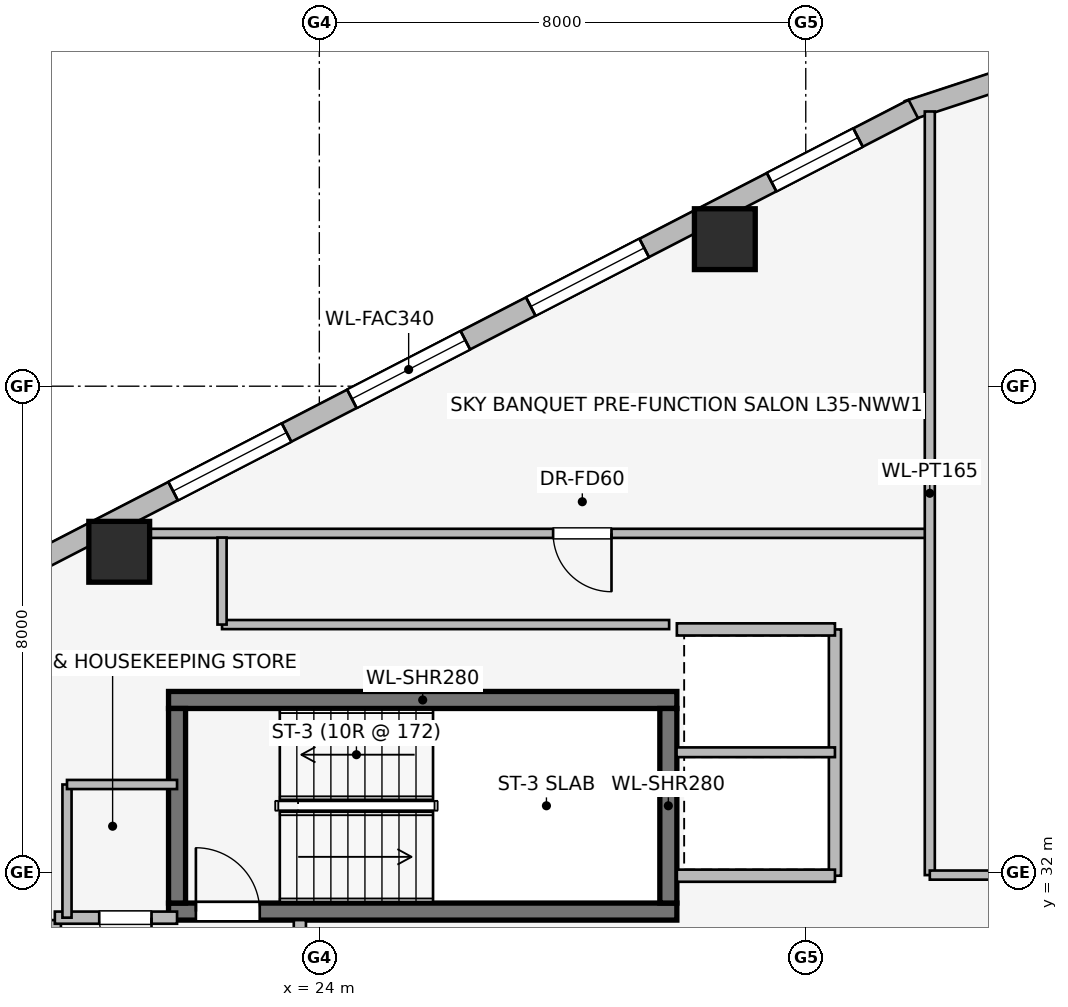
"""IFC4 building model, lengths in metres.
Left out: names, types, materials, properties, quantities, classifications, styles, units other than length and angle.
Written with IfcOpenShell. Run it as: python <this file> out.ifc"""

import sys

from ifc_helpers import new_model, si_unit, direction, frame, frame_2d, origin, origin_2d, place, context, subcontext, project, spatial, rectangle, extrude, element, fill, save


model = new_model("IFC4")
c1 = context("Model", 3, precision=1e-05, world=origin(), true_north=direction((0.0, 1.0)))
c2 = subcontext(c1, "Body", "Model", "MODEL_VIEW")
j1 = project(units=[si_unit("LENGTHUNIT", "METRE"), si_unit("PLANEANGLEUNIT", "RADIAN")], contexts=[c1])
p1 = place(None, origin())
s1 = spatial("IfcSite", under=j1, at=p1, CompositionType="ELEMENT")
p2 = place(p1, origin())
s2 = spatial("IfcBuilding", under=s1, at=p2, CompositionType="ELEMENT")
p3 = place(p2, frame((0.0, 0.0, 132.6)))
s3 = spatial("IfcBuildingStorey", under=s2, at=p3, CompositionType="ELEMENT", Elevation=132.6)
p4 = place(p3, frame((21.52, 31.36, 0.0), z_axis=(0.0, 0.0, 1.0), x_axis=(1.0, 0.0, 0.0)))
e1 = element("IfcWall", 1, at=p4, inside=s3, PredefinedType="SHEAR", context=c2, shape_type="SweptSolid", body=[
    extrude(rectangle(XDim=8.36, YDim=0.28, at=frame_2d((4.18, 0.0))), origin(), (0.0, 0.0, 1.0), 3.45),
])
p5 = place(p4, frame((0.45, 0.0, 0.0)))
e2 = element("IfcOpeningElement", 2, at=p5, cuts=e1, PredefinedType="OPENING", context=c2, shape_type="SweptSolid", body=[
    extrude(rectangle(XDim=1.05, YDim=2.0, at=frame_2d((0.525, 1.0))), frame((0.0, 0.15, 0.0), z_axis=(0.0, -1.0, 0.0), x_axis=(1.0, 0.0, 0.0)), (0.0, 0.0, 1.0), 0.3),
])
p6 = place(p3, frame((29.88, 34.84, 0.0), z_axis=(0.0, 0.0, 1.0), x_axis=(-1.0, 0.0, 0.0)))
e3 = element("IfcWall", 3, at=p6, inside=s3, PredefinedType="SHEAR", context=c2, shape_type="SweptSolid", body=[
    extrude(rectangle(XDim=8.36, YDim=0.28, at=frame_2d((4.18, 0.0))), origin(), (0.0, 0.0, 1.0), 3.45),
])
for number, where, z_axis, x_axis in (
    (4, (21.66, 34.7, 0.0), (0.0, 0.0, 1.0), (0.0, -1.0, 0.0)),
    (5, (29.74, 31.5, 0.0), (0.0, 0.0, 1.0), (0.0, 1.0, 0.0)),
):
    element("IfcWall", number, at=place(p3, frame(where, z_axis=z_axis, x_axis=x_axis)), inside=s3, PredefinedType="SHEAR", context=c2, shape_type="SweptSolid", body=[
        extrude(rectangle(XDim=3.2, YDim=0.28, at=frame_2d((1.6, 0.0))), origin(), (0.0, 0.0, 1.0), 3.45),
    ])
for number, where, z_axis, x_axis in (
    (6, (30.669, 42.418, 0.0), (0.0, 0.0, 1.0), (1.0, 0.0, 0.0)),
    (7, (20.709, 37.277, 0.0), (0.0, 0.0, 1.0), (1.0, 0.0, 0.0)),
):
    element("IfcColumn", number, at=place(p3, frame(where, z_axis=z_axis, x_axis=x_axis)), inside=s3, PredefinedType="COLUMN", context=c2, shape_type="SweptSolid", body=[
        extrude(rectangle(XDim=1.0, YDim=1.0, at=origin_2d()), origin(), (0.0, 0.0, 1.0), 3.45),
    ])
p7 = place(p3, frame((33.681, 44.532, 0.0), z_axis=(0.0, 0.0, 1.0), x_axis=(0.949937416267, 0.312440242569, 0.0)))
e8 = element("IfcWall", 8, at=p7, inside=s3, PredefinedType="STANDARD", context=c2, shape_type="SweptSolid", body=[
    extrude(rectangle(XDim=1.722, YDim=0.33, at=frame_2d((0.861, 0.0))), origin(), (0.0, 0.0, 1.0), 3.19),
])
p8 = place(p3, frame((17.169, 35.99, 0.0), z_axis=(0.0, 0.0, 1.0), x_axis=(0.888613612362, 0.458656568606, 0.0)))
e9 = element("IfcWall", 9, at=p8, inside=s3, PredefinedType="STANDARD", context=c2, shape_type="SweptSolid", body=[
    extrude(rectangle(XDim=18.681, YDim=0.34, at=frame_2d((9.34, 0.0))), origin(), (0.0, 0.0, 1.0), 3.19),
])
p9 = place(p8, frame((1.023, 0.0, 0.75)))
e10 = element("IfcOpeningElement", 10, at=p9, cuts=e9, PredefinedType="OPENING", context=c2, shape_type="SweptSolid", body=[
    extrude(rectangle(XDim=1.6, YDim=1.55, at=frame_2d((0.8, 0.775))), frame((0.0, 0.18, 0.0), z_axis=(0.0, -1.0, 0.0), x_axis=(1.0, 0.0, 0.0)), (0.0, 0.0, 1.0), 0.36),
])
p10 = place(p8, frame((4.981, 0.0, 0.75)))
e11 = element("IfcOpeningElement", 11, at=p10, cuts=e9, PredefinedType="OPENING", context=c2, shape_type="SweptSolid", body=[
    extrude(rectangle(XDim=2.1, YDim=1.5, at=frame_2d((1.05, 0.75))), frame((0.0, 0.18, 0.0), z_axis=(0.0, -1.0, 0.0), x_axis=(1.0, 0.0, 0.0)), (0.0, 0.0, 1.0), 0.36),
])
p11 = place(p8, frame((8.29, 0.0, 0.75)))
e12 = element("IfcOpeningElement", 12, at=p11, cuts=e9, PredefinedType="OPENING", context=c2, shape_type="SweptSolid", body=[
    extrude(rectangle(XDim=2.1, YDim=1.5, at=frame_2d((1.05, 0.75))), frame((0.0, 0.18, 0.0), z_axis=(0.0, -1.0, 0.0), x_axis=(1.0, 0.0, 0.0)), (0.0, 0.0, 1.0), 0.36),
])
p12 = place(p8, frame((11.6, 0.0, 0.75)))
e13 = element("IfcOpeningElement", 13, at=p12, cuts=e9, PredefinedType="OPENING", context=c2, shape_type="SweptSolid", body=[
    extrude(rectangle(XDim=2.1, YDim=1.5, at=frame_2d((1.05, 0.75))), frame((0.0, 0.18, 0.0), z_axis=(0.0, -1.0, 0.0), x_axis=(1.0, 0.0, 0.0)), (0.0, 0.0, 1.0), 0.36),
])
p13 = place(p8, frame((16.058, 0.0, 0.75)))
e14 = element("IfcOpeningElement", 14, at=p13, cuts=e9, PredefinedType="OPENING", context=c2, shape_type="SweptSolid", body=[
    extrude(rectangle(XDim=1.6, YDim=1.55, at=frame_2d((0.8, 0.775))), frame((0.0, 0.18, 0.0), z_axis=(0.0, -1.0, 0.0), x_axis=(1.0, 0.0, 0.0)), (0.0, 0.0, 1.0), 0.36),
])
p14 = place(p3, frame((19.65, 25.68, 0.0), z_axis=(0.0, 0.0, 1.0), x_axis=(0.0, 1.0, 0.0)))
e15 = element("IfcWall", 15, at=p14, inside=s3, PredefinedType="PARTITIONING", context=c2, shape_type="SweptSolid", body=[
    extrude(rectangle(XDim=5.54, YDim=0.2, at=frame_2d((2.77, 0.0))), origin(), (0.0, 0.0, 1.0), 3.19),
])
p15 = place(p14, frame((0.62, 0.0, 0.0)))
e16 = element("IfcOpeningElement", 16, at=p15, cuts=e15, PredefinedType="OPENING", context=c2, shape_type="SweptSolid", body=[
    extrude(rectangle(XDim=1.1, YDim=2.2, at=frame_2d((0.55, 1.1))), frame((0.0, 0.11, 0.0), z_axis=(0.0, -1.0, 0.0), x_axis=(1.0, 0.0, 0.0)), (0.0, 0.0, 1.0), 0.22),
])
p16 = place(p14, frame((3.12, 0.0, 0.0)))
e17 = element("IfcOpeningElement", 17, at=p16, cuts=e15, PredefinedType="OPENING", context=c2, shape_type="SweptSolid", body=[
    extrude(rectangle(XDim=1.1, YDim=2.2, at=frame_2d((0.55, 1.1))), frame((0.0, 0.11, 0.0), z_axis=(0.0, -1.0, 0.0), x_axis=(1.0, 0.0, 0.0)), (0.0, 0.0, 1.0), 0.22),
])
p17 = place(p3, frame((23.68, 25.68, 0.0), z_axis=(0.0, 0.0, 1.0), x_axis=(0.0, 1.0, 0.0)))
e18 = element("IfcWall", 18, at=p17, inside=s3, PredefinedType="PARTITIONING", context=c2, shape_type="SweptSolid", body=[
    extrude(rectangle(XDim=5.54, YDim=0.2, at=frame_2d((2.77, 0.0))), origin(), (0.0, 0.0, 1.0), 3.19),
])
p18 = place(p17, frame((1.8, 0.0, 0.0)))
e19 = element("IfcOpeningElement", 19, at=p18, cuts=e18, PredefinedType="OPENING", context=c2, shape_type="SweptSolid", body=[
    extrude(rectangle(XDim=1.05, YDim=2.0, at=frame_2d((0.525, 1.0))), frame((0.0, 0.11, 0.0), z_axis=(0.0, -1.0, 0.0), x_axis=(1.0, 0.0, 0.0)), (0.0, 0.0, 1.0), 0.22),
])
p19 = place(p3, frame((21.66, 31.26, 0.0), z_axis=(0.0, 0.0, 1.0), x_axis=(-1.0, 0.0, 0.0)))
e20 = element("IfcWall", 20, at=p19, inside=s3, PredefinedType="PARTITIONING", context=c2, shape_type="SweptSolid", body=[
    extrude(rectangle(XDim=2.01, YDim=0.2, at=frame_2d((1.005, 0.0))), origin(), (0.0, 0.0, 1.0), 3.19),
])
p20 = place(p19, frame((0.42, 0.0, 0.0)))
e21 = element("IfcOpeningElement", 21, at=p20, cuts=e20, PredefinedType="OPENING", context=c2, shape_type="SweptSolid", body=[
    extrude(rectangle(XDim=0.86, YDim=2.0, at=frame_2d((0.43, 1.0))), frame((0.0, 0.11, 0.0), z_axis=(0.0, -1.0, 0.0), x_axis=(1.0, 0.0, 0.0)), (0.0, 0.0, 1.0), 0.22),
])
p21 = place(p3, frame((32.48, 31.95, 0.0), z_axis=(0.0, 0.0, 1.0), x_axis=(0.0, 1.0, 0.0)))
e22 = element("IfcWall", 22, at=p21, inside=s3, PredefinedType="PARTITIONING", context=c2, shape_type="SweptSolid", body=[
    extrude(rectangle(XDim=4.05, YDim=0.2, at=frame_2d((2.025, 0.0))), origin(), (0.0, 0.0, 1.0), 3.19),
])
for number, where, z_axis, x_axis in (
    (23, (29.88, 36.0, 0.0), (0.0, 0.0, 1.0), (1.0, 0.0, 0.0)),
    (24, (32.48, 31.95, 0.0), (0.0, 0.0, 1.0), (-1.0, 0.0, 0.0)),
):
    element("IfcWall", number, at=place(p3, frame(where, z_axis=z_axis, x_axis=x_axis)), inside=s3, PredefinedType="PARTITIONING", context=c2, shape_type="SweptSolid", body=[
        extrude(rectangle(XDim=2.6, YDim=0.2, at=frame_2d((1.3, 0.0))), origin(), (0.0, 0.0, 1.0), 3.19),
    ])
p22 = place(p3, frame((29.875, 33.98, 0.0), z_axis=(0.0, 0.0, 1.0), x_axis=(1.0, 0.0, 0.0)))
e25 = element("IfcWall", 25, at=p22, inside=s3, PredefinedType="PARTITIONING", context=c2, shape_type="SweptSolid", body=[
    extrude(rectangle(XDim=2.605, YDim=0.16, at=frame_2d((1.302, 0.0))), origin(), (0.0, 0.0, 1.0), 3.19),
])
p23 = place(p3, frame((19.85, 33.45, 0.0), z_axis=(0.0, 0.0, 1.0), x_axis=(0.0, -1.0, 0.0)))
e26 = element("IfcWall", 26, at=p23, inside=s3, PredefinedType="PARTITIONING", context=c2, shape_type="SweptSolid", body=[
    extrude(rectangle(XDim=2.19, YDim=0.15, at=frame_2d((1.095, 0.0))), origin(), (0.0, 0.0, 1.0), 3.19),
])
p24 = place(p3, frame((21.66, 33.45, 0.0), z_axis=(0.0, 0.0, 1.0), x_axis=(-1.0, 0.0, 0.0)))
e27 = element("IfcWall", 27, at=p24, inside=s3, PredefinedType="PARTITIONING", context=c2, shape_type="SweptSolid", body=[
    extrude(rectangle(XDim=1.81, YDim=0.15, at=frame_2d((0.905, 0.0))), origin(), (0.0, 0.0, 1.0), 3.19),
])
p25 = place(p3, frame((34.0, 37.58, 0.0), z_axis=(0.0, 0.0, 1.0), x_axis=(-1.0, 0.0, 0.0)))
e28 = element("IfcWall", 28, at=p25, inside=s3, PredefinedType="PARTITIONING", context=c2, shape_type="SweptSolid", body=[
    extrude(rectangle(XDim=13.707, YDim=0.15, at=frame_2d((6.854, 0.0))), origin(), (0.0, 0.0, 1.0), 2.582),
])
p26 = place(p25, frame((5.195, 0.0, 0.0)))
e29 = element("IfcOpeningElement", 29, at=p26, cuts=e28, PredefinedType="OPENING", context=c2, shape_type="SweptSolid", body=[
    extrude(rectangle(XDim=0.96, YDim=2.0, at=frame_2d((0.48, 1.0))), frame((0.0, 0.085, 0.0), z_axis=(0.0, -1.0, 0.0), x_axis=(1.0, 0.0, 0.0)), (0.0, 0.0, 1.0), 0.17),
])
p27 = place(p3, frame((34.04, 31.96, 0.0), z_axis=(0.0, 0.0, 1.0), x_axis=(0.0, 1.0, 0.0)))
e30 = element("IfcWall", 30, at=p27, inside=s3, PredefinedType="PARTITIONING", context=c2, shape_type="SweptSolid", body=[
    extrude(rectangle(XDim=12.558, YDim=0.165, at=frame_2d((6.279, 0.0))), origin(), (0.0, 0.0, 1.0), 3.19),
])
p28 = place(p3, frame((57.208, 31.96, 0.0), z_axis=(0.0, 0.0, 1.0), x_axis=(-1.0, 0.0, 0.0)))
e31 = element("IfcWall", 31, at=p28, inside=s3, PredefinedType="PARTITIONING", context=c2, shape_type="SweptSolid", body=[
    extrude(rectangle(XDim=23.168, YDim=0.15, at=frame_2d((11.584, 0.0))), origin(), (0.0, 0.0, 1.0), 3.19),
])
p29 = place(p28, frame((11.09, 0.0, 0.0)))
e32 = element("IfcOpeningElement", 32, at=p29, cuts=e31, PredefinedType="OPENING", context=c2, shape_type="SweptSolid", body=[
    extrude(rectangle(XDim=0.96, YDim=2.0, at=frame_2d((0.48, 1.0))), frame((0.0, 0.085, 0.0), z_axis=(0.0, -1.0, 0.0), x_axis=(1.0, 0.0, 0.0)), (0.0, 0.0, 1.0), 0.17),
])
p30 = place(p3, frame((29.753, 36.08, 0.0), z_axis=(0.0, 0.0, 1.0), x_axis=(-1.0, 0.0, 0.0)))
e33 = element("IfcWall", 33, at=p30, inside=s3, PredefinedType="PARTITIONING", context=c2, shape_type="SweptSolid", body=[
    extrude(rectangle(XDim=7.353, YDim=0.15, at=frame_2d((3.677, 0.0))), origin(), (0.0, 0.0, 1.0), 2.582),
])
p31 = place(p3, frame((22.4, 36.08, 0.0), z_axis=(0.0, 0.0, 1.0), x_axis=(0.0, 1.0, 0.0)))
e34 = element("IfcWall", 34, at=p31, inside=s3, PredefinedType="PARTITIONING", context=c2, shape_type="SweptSolid", body=[
    extrude(rectangle(XDim=1.43, YDim=0.15, at=frame_2d((0.715, 0.0))), origin(), (0.0, 0.0, 1.0), 3.19),
])
p32 = place(p10, origin())
e35 = element("IfcWindow", 35, at=p32, inside=s3, PartitioningType="SINGLE_PANEL", PredefinedType="WINDOW", context=c2, shape_type="SweptSolid", body=[
    extrude(rectangle(XDim=2.1, YDim=1.5, at=frame_2d((1.05, 0.75))), frame((0.0, 0.03, 0.0), z_axis=(0.0, -1.0, 0.0), x_axis=(1.0, 0.0, 0.0)), (0.0, 0.0, 1.0), 0.06),
])
fill(e11, e35)
p33 = place(p11, origin())
e36 = element("IfcWindow", 36, at=p33, inside=s3, PartitioningType="SINGLE_PANEL", PredefinedType="WINDOW", context=c2, shape_type="SweptSolid", body=[
    extrude(rectangle(XDim=2.1, YDim=1.5, at=frame_2d((1.05, 0.75))), frame((0.0, 0.03, 0.0), z_axis=(0.0, -1.0, 0.0), x_axis=(1.0, 0.0, 0.0)), (0.0, 0.0, 1.0), 0.06),
])
fill(e12, e36)
p34 = place(p12, origin())
e37 = element("IfcWindow", 37, at=p34, inside=s3, PartitioningType="SINGLE_PANEL", PredefinedType="WINDOW", context=c2, shape_type="SweptSolid", body=[
    extrude(rectangle(XDim=2.1, YDim=1.5, at=frame_2d((1.05, 0.75))), frame((0.0, 0.03, 0.0), z_axis=(0.0, -1.0, 0.0), x_axis=(1.0, 0.0, 0.0)), (0.0, 0.0, 1.0), 0.06),
])
fill(e13, e37)
p35 = place(p13, origin())
e38 = element("IfcWindow", 38, at=p35, inside=s3, PartitioningType="SINGLE_PANEL", PredefinedType="WINDOW", context=c2, shape_type="SweptSolid", body=[
    extrude(rectangle(XDim=1.6, YDim=1.55, at=frame_2d((0.8, 0.775))), frame((0.0, 0.03, 0.0), z_axis=(0.0, -1.0, 0.0), x_axis=(1.0, 0.0, 0.0)), (0.0, 0.0, 1.0), 0.06),
])
fill(e14, e38)
p36 = place(p5, origin())
e39 = element("IfcDoor", 39, at=p36, inside=s3, OperationType="SINGLE_SWING_LEFT", PredefinedType="DOOR", context=c2, shape_type="SweptSolid", body=[
    extrude(rectangle(XDim=1.05, YDim=2.0, at=frame_2d((0.525, 1.0))), frame((0.0, 0.025, 0.0), z_axis=(0.0, -1.0, 0.0), x_axis=(1.0, 0.0, 0.0)), (0.0, 0.0, 1.0), 0.05),
])
fill(e2, e39)
p37 = place(p20, origin())
e40 = element("IfcDoor", 40, at=p37, inside=s3, OperationType="SINGLE_SWING_LEFT", PredefinedType="DOOR", context=c2, shape_type="SweptSolid", body=[
    extrude(rectangle(XDim=0.86, YDim=2.0, at=frame_2d((0.43, 1.0))), frame((0.0, 0.025, 0.0), z_axis=(0.0, -1.0, 0.0), x_axis=(1.0, 0.0, 0.0)), (0.0, 0.0, 1.0), 0.05),
])
fill(e21, e40)
p38 = place(p26, origin())
e41 = element("IfcDoor", 41, at=p38, inside=s3, OperationType="SINGLE_SWING_LEFT", PredefinedType="DOOR", context=c2, shape_type="SweptSolid", body=[
    extrude(rectangle(XDim=0.96, YDim=2.0, at=frame_2d((0.48, 1.0))), frame((0.0, 0.025, 0.0), z_axis=(0.0, -1.0, 0.0), x_axis=(1.0, 0.0, 0.0)), (0.0, 0.0, 1.0), 0.05),
])
fill(e29, e41)
save(model, sys.argv[1])
